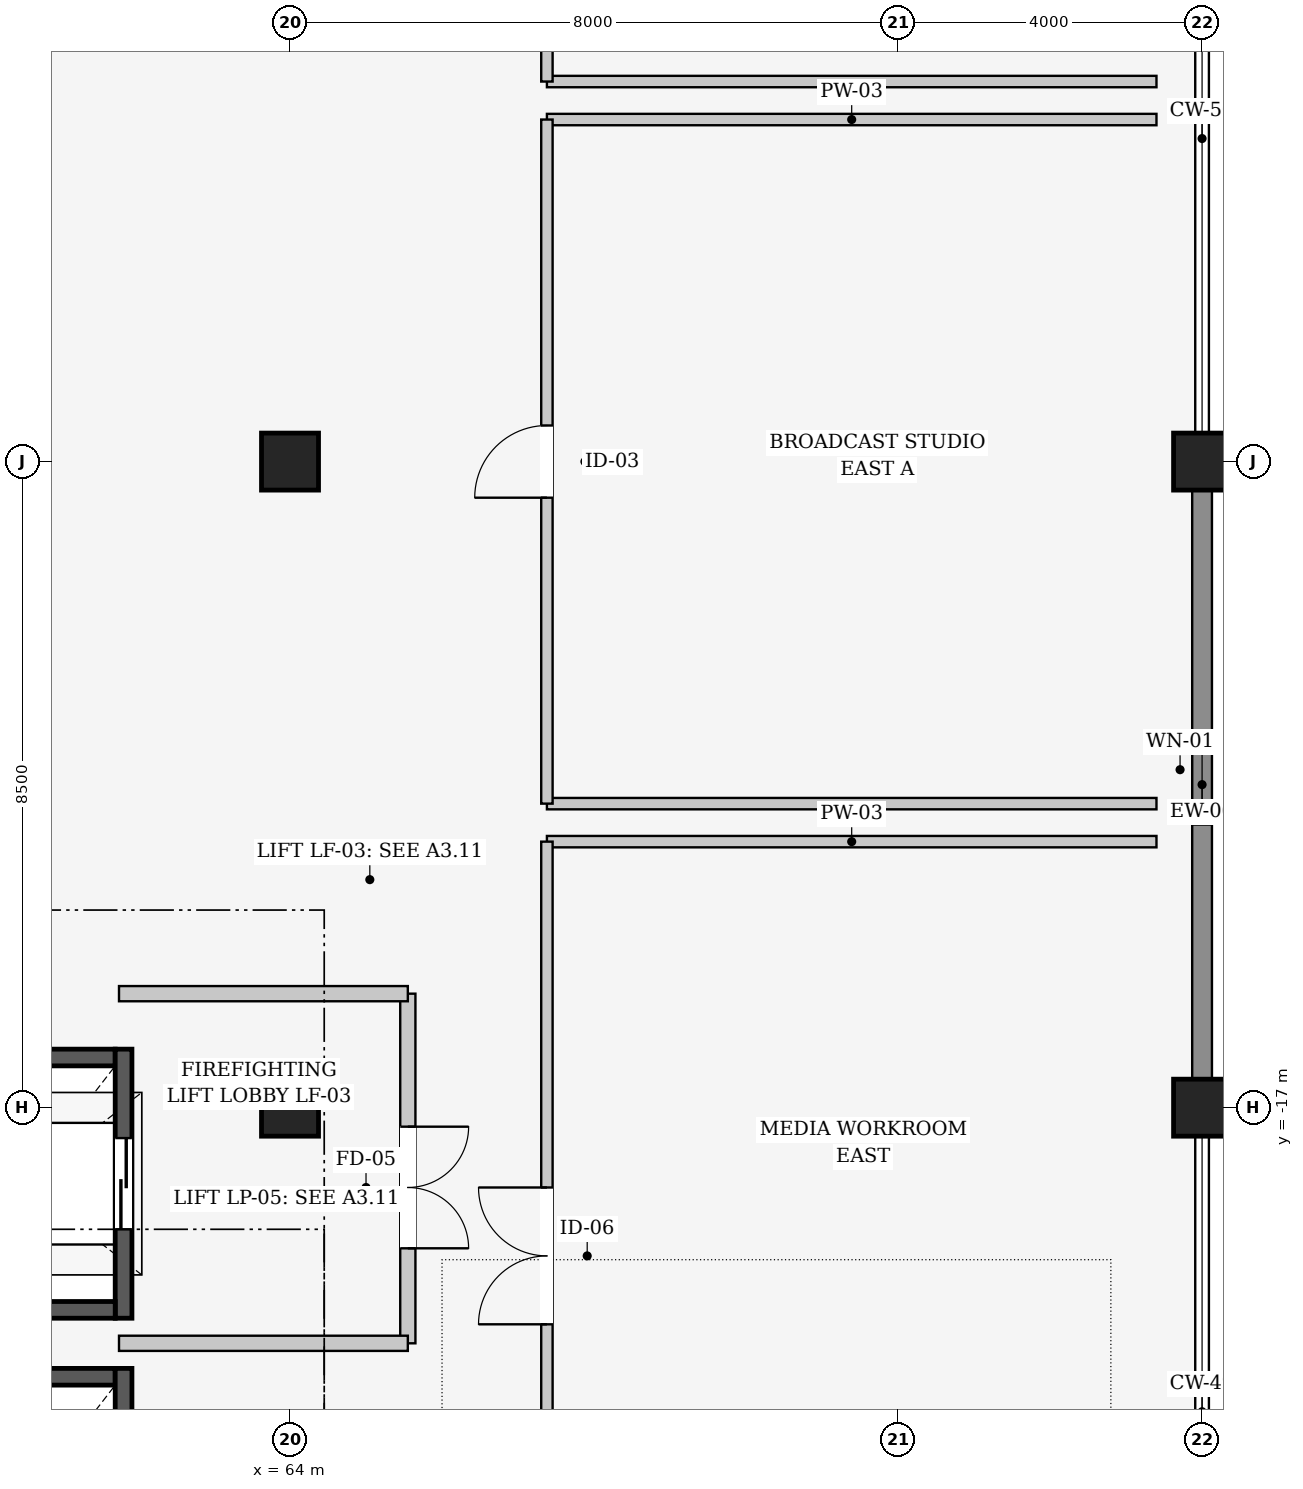
"""IFC4 building model, lengths in metres.
Left out: names, types, materials, properties, quantities, classifications, styles, units other than length and angle.
Written with IfcOpenShell. Run it as: python <this file> out.ifc"""

import sys

from ifc_helpers import new_model, si_unit, direction, frame, frame_2d, origin, origin_2d, place, context, subcontext, project, spatial, rectangle, extrude, element, fill, save


model = new_model("IFC4")
c1 = context("Model", 3, precision=1e-05, world=origin(), true_north=direction((0.0, 1.0)))
c2 = subcontext(c1, "Body", "Model", "MODEL_VIEW")
j1 = project(units=[si_unit("LENGTHUNIT", "METRE"), si_unit("PLANEANGLEUNIT", "RADIAN")], contexts=[c1])
p1 = place(None, origin())
s1 = spatial("IfcSite", under=j1, at=p1, CompositionType="ELEMENT")
p2 = place(p1, origin())
s2 = spatial("IfcBuilding", under=s1, at=p2, CompositionType="ELEMENT")
p3 = place(p2, frame((0.0, 0.0, 26.4)))
s3 = spatial("IfcBuildingStorey", under=s2, at=p3, CompositionType="ELEMENT", Elevation=26.4)
for number, where, z_axis, x_axis in (
    (1, (64.0, -17.0, 0.0), (0.0, 0.0, 1.0), (1.0, 0.0, 0.0)),
    (2, (64.0, -8.5, 0.0), (0.0, 0.0, 1.0), (1.0, 0.0, 0.0)),
    (3, (76.0, -17.0, 0.0), (0.0, 0.0, 1.0), (1.0, 0.0, 0.0)),
    (4, (76.0, -8.5, 0.0), (0.0, 0.0, 1.0), (1.0, 0.0, 0.0)),
):
    element("IfcColumn", number, at=place(p3, frame(where, z_axis=z_axis, x_axis=x_axis)), inside=s3, PredefinedType="COLUMN", context=c2, shape_type="SweptSolid", body=[
        extrude(rectangle(XDim=0.75, YDim=0.75, at=origin_2d()), origin(), (0.0, 0.0, 1.0), 5.4),
    ])
p4 = place(p3, frame((76.0, -8.857, 0.0), z_axis=(0.0, 0.0, 1.0), x_axis=(0.0, -1.0, 0.0)))
e5 = element("IfcWall", 5, at=p4, inside=s3, PredefinedType="SOLIDWALL", context=c2, shape_type="SweptSolid", body=[
    extrude(rectangle(XDim=7.786, YDim=0.26, at=frame_2d((3.893, 0.0))), origin(), (0.0, 0.0, 1.0), 4.22),
])
p5 = place(p4, frame((3.368, 0.0, 0.95)))
e6 = element("IfcOpeningElement", 6, at=p5, cuts=e5, PredefinedType="OPENING", context=c2, shape_type="SweptSolid", body=[
    extrude(rectangle(XDim=1.05, YDim=1.25, at=frame_2d((0.525, 0.625))), frame((0.0, 0.14, 0.0), z_axis=(0.0, -1.0, 0.0), x_axis=(1.0, 0.0, 0.0)), (0.0, 0.0, 1.0), 0.28),
])
p6 = place(p3, frame((59.3, -16.34, 0.0), z_axis=(0.0, 0.0, 1.0), x_axis=(1.0, 0.0, 0.0)))
e7 = element("IfcWall", 7, at=p6, inside=s3, PredefinedType="SHEAR", context=c2, shape_type="SweptSolid", body=[
    extrude(rectangle(XDim=2.4, YDim=0.22, at=frame_2d((1.2, 0.0))), origin(), (0.0, 0.0, 1.0), 6.8),
])
p7 = place(p3, frame((61.81, -16.23, 0.0), z_axis=(0.0, 0.0, 1.0), x_axis=(0.0, -1.0, 0.0)))
e8 = element("IfcWall", 8, at=p7, inside=s3, PredefinedType="SHEAR", context=c2, shape_type="SweptSolid", body=[
    extrude(rectangle(XDim=3.54, YDim=0.22, at=frame_2d((1.77, 0.0))), origin(), (0.0, 0.0, 1.0), 6.8),
])
p8 = place(p7, frame((1.17, 0.0, 0.0)))
e9 = element("IfcOpeningElement", 9, at=p8, cuts=e8, PredefinedType="OPENING", context=c2, shape_type="SweptSolid", body=[
    extrude(rectangle(XDim=1.2, YDim=2.2, at=frame_2d((0.6, 1.1))), frame((0.0, 0.12, 0.0), z_axis=(0.0, -1.0, 0.0), x_axis=(1.0, 0.0, 0.0)), (0.0, 0.0, 1.0), 0.24),
])
for number, where, z_axis, x_axis in (
    (10, (61.7, -19.66, 0.0), (0.0, 0.0, 1.0), (-1.0, 0.0, 0.0)),
    (11, (59.3, -20.54, 0.0), (0.0, 0.0, 1.0), (1.0, 0.0, 0.0)),
):
    element("IfcWall", number, at=place(p3, frame(where, z_axis=z_axis, x_axis=x_axis)), inside=s3, PredefinedType="SHEAR", context=c2, shape_type="SweptSolid", body=[
        extrude(rectangle(XDim=2.4, YDim=0.22, at=frame_2d((1.2, 0.0))), origin(), (0.0, 0.0, 1.0), 6.8),
    ])
p9 = place(p3, frame((61.81, -20.43, 0.0), z_axis=(0.0, 0.0, 1.0), x_axis=(0.0, -1.0, 0.0)))
e12 = element("IfcWall", 12, at=p9, inside=s3, PredefinedType="SHEAR", context=c2, shape_type="SweptSolid", body=[
    extrude(rectangle(XDim=3.54, YDim=0.22, at=frame_2d((1.77, 0.0))), origin(), (0.0, 0.0, 1.0), 6.8),
])
p10 = place(p9, frame((1.22, 0.0, 0.0)))
e13 = element("IfcOpeningElement", 13, at=p10, cuts=e12, PredefinedType="OPENING", context=c2, shape_type="SweptSolid", body=[
    extrude(rectangle(XDim=1.1, YDim=2.2, at=frame_2d((0.55, 1.1))), frame((0.0, 0.12, 0.0), z_axis=(0.0, -1.0, 0.0), x_axis=(1.0, 0.0, 0.0)), (0.0, 0.0, 1.0), 0.24),
])
p11 = place(p3, frame((65.55, -15.5, 0.0), z_axis=(0.0, 0.0, 1.0), x_axis=(0.0, -1.0, 0.0)))
e14 = element("IfcWall", 14, at=p11, inside=s3, PredefinedType="PARTITIONING", context=c2, shape_type="SweptSolid", body=[
    extrude(rectangle(XDim=4.6, YDim=0.2, at=frame_2d((2.3, 0.0))), origin(), (0.0, 0.0, 1.0), 4.205),
])
p12 = place(p11, frame((1.75, 0.0, 0.0)))
e15 = element("IfcOpeningElement", 15, at=p12, cuts=e14, PredefinedType="OPENING", context=c2, shape_type="SweptSolid", body=[
    extrude(rectangle(XDim=1.6, YDim=2.2, at=frame_2d((0.8, 1.1))), frame((0.0, 0.11, 0.0), z_axis=(0.0, -1.0, 0.0), x_axis=(1.0, 0.0, 0.0)), (0.0, 0.0, 1.0), 0.22),
])
for number, where, z_axis, x_axis in (
    (16, (61.75, -15.5, 0.0), (0.0, 0.0, 1.0), (1.0, 0.0, 0.0)),
    (17, (65.55, -20.1, 0.0), (0.0, 0.0, 1.0), (-1.0, 0.0, 0.0)),
):
    element("IfcWall", number, at=place(p3, frame(where, z_axis=z_axis, x_axis=x_axis)), inside=s3, PredefinedType="PARTITIONING", context=c2, shape_type="SweptSolid", body=[
        extrude(rectangle(XDim=3.8, YDim=0.2, at=frame_2d((1.9, 0.0))), origin(), (0.0, 0.0, 1.0), 4.505),
    ])
p13 = place(p3, frame((67.38, -13.5, 0.0), z_axis=(0.0, 0.0, 1.0), x_axis=(1.0, 0.0, 0.0)))
e18 = element("IfcWall", 18, at=p13, inside=s3, PredefinedType="PARTITIONING", context=c2, shape_type="SweptSolid", body=[
    extrude(rectangle(XDim=8.02, YDim=0.15, at=frame_2d((4.01, 0.0))), origin(), (0.0, 0.0, 1.0), 5.04),
])
p14 = place(p3, frame((67.38, -24.4, 0.0), z_axis=(0.0, 0.0, 1.0), x_axis=(0.0, 1.0, 0.0)))
e19 = element("IfcWall", 19, at=p14, inside=s3, PredefinedType="PARTITIONING", context=c2, shape_type="SweptSolid", body=[
    extrude(rectangle(XDim=10.9, YDim=0.15, at=frame_2d((5.45, 0.0))), origin(), (0.0, 0.0, 1.0), 4.205),
])
p15 = place(p14, frame((4.55, 0.0, 0.0)))
e20 = element("IfcOpeningElement", 20, at=p15, cuts=e19, PredefinedType="OPENING", context=c2, shape_type="SweptSolid", body=[
    extrude(rectangle(XDim=1.8, YDim=2.2, at=frame_2d((0.9, 1.1))), frame((0.0, 0.085, 0.0), z_axis=(0.0, -1.0, 0.0), x_axis=(1.0, 0.0, 0.0)), (0.0, 0.0, 1.0), 0.17),
])
for number, where, z_axis, x_axis in (
    (21, (67.38, -4.0, 0.0), (0.0, 0.0, 1.0), (1.0, 0.0, 0.0)),
    (22, (75.4, -13.0, 0.0), (0.0, 0.0, 1.0), (-1.0, 0.0, 0.0)),
):
    element("IfcWall", number, at=place(p3, frame(where, z_axis=z_axis, x_axis=x_axis)), inside=s3, PredefinedType="PARTITIONING", context=c2, shape_type="SweptSolid", body=[
        extrude(rectangle(XDim=8.02, YDim=0.15, at=frame_2d((4.01, 0.0))), origin(), (0.0, 0.0, 1.0), 4.842),
    ])
p16 = place(p3, frame((67.38, -13.0, 0.0), z_axis=(0.0, 0.0, 1.0), x_axis=(0.0, 1.0, 0.0)))
e23 = element("IfcWall", 23, at=p16, inside=s3, PredefinedType="PARTITIONING", context=c2, shape_type="SweptSolid", body=[
    extrude(rectangle(XDim=9.0, YDim=0.15, at=frame_2d((4.5, 0.0))), origin(), (0.0, 0.0, 1.0), 4.205),
])
p17 = place(p16, frame((4.025, 0.0, 0.0)))
e24 = element("IfcOpeningElement", 24, at=p17, cuts=e23, PredefinedType="OPENING", context=c2, shape_type="SweptSolid", body=[
    extrude(rectangle(XDim=0.95, YDim=2.15, at=frame_2d((0.475, 1.075))), frame((0.0, 0.085, 0.0), z_axis=(0.0, -1.0, 0.0), x_axis=(1.0, 0.0, 0.0)), (0.0, 0.0, 1.0), 0.17),
])
p18 = place(p3, frame((75.4, -3.5, 0.0), z_axis=(0.0, 0.0, 1.0), x_axis=(-1.0, 0.0, 0.0)))
e25 = element("IfcWall", 25, at=p18, inside=s3, PredefinedType="PARTITIONING", context=c2, shape_type="SweptSolid", body=[
    extrude(rectangle(XDim=8.02, YDim=0.15, at=frame_2d((4.01, 0.0))), origin(), (0.0, 0.0, 1.0), 5.04),
])
p19 = place(p3, frame((67.38, -3.5, 0.0), z_axis=(0.0, 0.0, 1.0), x_axis=(0.0, 1.0, 0.0)))
e26 = element("IfcWall", 26, at=p19, inside=s3, PredefinedType="PARTITIONING", context=c2, shape_type="SweptSolid", body=[
    extrude(rectangle(XDim=8.0, YDim=0.15, at=frame_2d((4.0, 0.0))), origin(), (0.0, 0.0, 1.0), 4.205),
])
p20 = place(p19, frame((3.525, 0.0, 0.0)))
e27 = element("IfcOpeningElement", 27, at=p20, cuts=e26, PredefinedType="OPENING", context=c2, shape_type="SweptSolid", body=[
    extrude(rectangle(XDim=0.95, YDim=2.15, at=frame_2d((0.475, 1.075))), frame((0.0, 0.085, 0.0), z_axis=(0.0, -1.0, 0.0), x_axis=(1.0, 0.0, 0.0)), (0.0, 0.0, 1.0), 0.17),
])
p21 = place(p5, origin())
e28 = element("IfcWindow", 28, at=p21, inside=s3, PartitioningType="SINGLE_PANEL", PredefinedType="WINDOW", context=c2, shape_type="SweptSolid", body=[
    extrude(rectangle(XDim=1.05, YDim=1.25, at=frame_2d((0.525, 0.625))), frame((0.0, 0.03, 0.0), z_axis=(0.0, -1.0, 0.0), x_axis=(1.0, 0.0, 0.0)), (0.0, 0.0, 1.0), 0.06),
])
fill(e6, e28)
p22 = place(p8, origin())
e29 = element("IfcDoor", 29, at=p22, inside=s3, OperationType="SLIDING_TO_LEFT", PredefinedType="DOOR", context=c2, shape_type="SweptSolid", body=[
    extrude(rectangle(XDim=1.2, YDim=2.2, at=frame_2d((0.6, 1.1))), frame((0.0, 0.025, 0.0), z_axis=(0.0, -1.0, 0.0), x_axis=(1.0, 0.0, 0.0)), (0.0, 0.0, 1.0), 0.05),
])
fill(e9, e29)
p23 = place(p12, origin())
e30 = element("IfcDoor", 30, at=p23, inside=s3, OperationType="DOUBLE_DOOR_SINGLE_SWING", PredefinedType="DOOR", context=c2, shape_type="SweptSolid", body=[
    extrude(rectangle(XDim=1.6, YDim=2.2, at=frame_2d((0.8, 1.1))), frame((0.0, 0.025, 0.0), z_axis=(0.0, -1.0, 0.0), x_axis=(1.0, 0.0, 0.0)), (0.0, 0.0, 1.0), 0.05),
])
fill(e15, e30)
p24 = place(p15, origin())
e31 = element("IfcDoor", 31, at=p24, inside=s3, OperationType="DOUBLE_DOOR_SINGLE_SWING", PredefinedType="DOOR", context=c2, shape_type="SweptSolid", body=[
    extrude(rectangle(XDim=1.8, YDim=2.2, at=frame_2d((0.9, 1.1))), frame((0.0, 0.025, 0.0), z_axis=(0.0, -1.0, 0.0), x_axis=(1.0, 0.0, 0.0)), (0.0, 0.0, 1.0), 0.05),
])
fill(e20, e31)
p25 = place(p17, origin())
e32 = element("IfcDoor", 32, at=p25, inside=s3, OperationType="SINGLE_SWING_LEFT", PredefinedType="DOOR", context=c2, shape_type="SweptSolid", body=[
    extrude(rectangle(XDim=0.95, YDim=2.15, at=frame_2d((0.475, 1.075))), frame((0.0, 0.025, 0.0), z_axis=(0.0, -1.0, 0.0), x_axis=(1.0, 0.0, 0.0)), (0.0, 0.0, 1.0), 0.05),
])
fill(e24, e32)
save(model, sys.argv[1])
